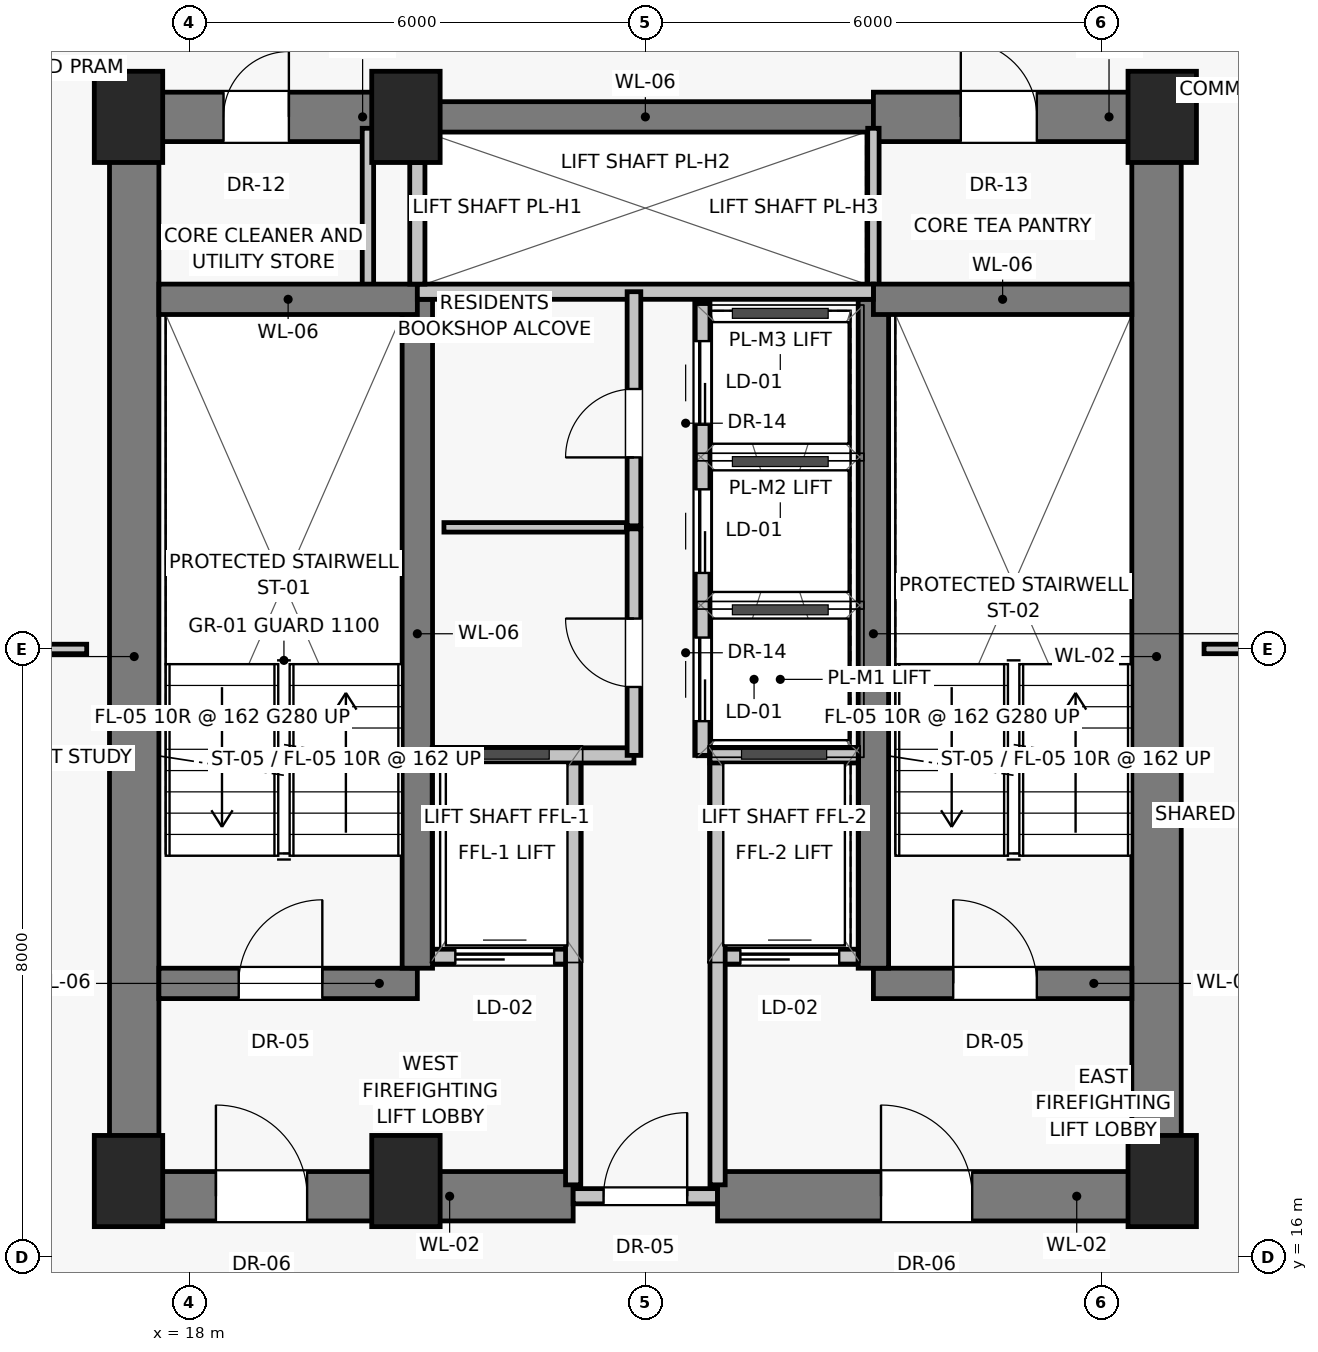
"""IFC4 building model, lengths in metres.
Left out: names, types, materials, properties, quantities, classifications, styles, units other than length and angle.
Written with IfcOpenShell. Run it as: python <this file> out.ifc"""

import sys

from ifc_helpers import new_model, si_unit, direction, frame, frame_2d, origin, origin_2d, place, context, subcontext, project, spatial, rectangle, extrude, source, transform, mapped, element, fill, save


model = new_model("IFC4")
c1 = context("Model", 3, precision=1e-05, world=origin(), true_north=direction((0.0, 1.0)))
c2 = subcontext(c1, "Body", "Model", "MODEL_VIEW")
j1 = project(units=[si_unit("LENGTHUNIT", "METRE"), si_unit("PLANEANGLEUNIT", "RADIAN")], contexts=[c1])
p1 = place(None, origin())
s1 = spatial("IfcSite", under=j1, at=p1, CompositionType="ELEMENT")
p2 = place(p1, origin())
s2 = spatial("IfcBuilding", under=s1, at=p2, CompositionType="ELEMENT")
p3 = place(p2, frame((0.0, 0.0, 145.75)))
s3 = spatial("IfcBuildingStorey", under=s2, at=p3, CompositionType="ELEMENT", Elevation=145.75)
for number, where, z_axis, x_axis in (
    (1, (17.2, 17.0, 0.0), (0.0, 0.0, 1.0), (1.0, 0.0, 0.0)),
    (2, (20.85, 17.0, 0.0), (0.0, 0.0, 1.0), (1.0, 0.0, 0.0)),
    (3, (30.8, 17.0, 0.0), (0.0, 0.0, 1.0), (1.0, 0.0, 0.0)),
    (4, (17.2, 31.0, 0.0), (0.0, 0.0, 1.0), (1.0, 0.0, 0.0)),
    (5, (20.85, 31.0, 0.0), (0.0, 0.0, 1.0), (1.0, 0.0, 0.0)),
    (6, (30.8, 31.0, 0.0), (0.0, 0.0, 1.0), (1.0, 0.0, 0.0)),
):
    element("IfcColumn", number, at=place(p3, frame(where, z_axis=z_axis, x_axis=x_axis)), inside=s3, PredefinedType="PILASTER", context=c2, shape_type="SweptSolid", body=[
        extrude(rectangle(XDim=0.9, YDim=1.2, at=origin_2d()), origin(), (0.0, 0.0, 1.0), 3.25),
    ])
for number, where, z_axis, x_axis in (
    (7, (17.275, 16.8, 0.0), (0.0, 0.0, 1.0), (0.0, 1.0, 0.0)),
    (8, (30.725, 16.8, 0.0), (0.0, 0.0, 1.0), (0.0, 1.0, 0.0)),
):
    element("IfcWall", number, at=place(p3, frame(where, z_axis=z_axis, x_axis=x_axis)), inside=s3, PredefinedType="SHEAR", context=c2, shape_type="SweptSolid", body=[
        extrude(rectangle(XDim=14.2, YDim=0.65, at=frame_2d((7.1, 0.0))), origin(), (0.0, 0.0, 1.0), 3.0),
    ])
p4 = place(p3, frame((17.2, 16.8, 0.0), z_axis=(0.0, 0.0, 1.0), x_axis=(1.0, 0.0, 0.0)))
e9 = element("IfcWall", 9, at=p4, inside=s3, PredefinedType="SHEAR", context=c2, shape_type="SweptSolid", body=[
    extrude(rectangle(XDim=5.85, YDim=0.65, at=frame_2d((2.925, 0.0))), origin(), (0.0, 0.0, 1.0), 3.0),
])
p5 = place(p4, frame((1.15, 0.0, 0.0)))
e10 = element("IfcOpeningElement", 10, at=p5, cuts=e9, PredefinedType="OPENING", context=c2, shape_type="SweptSolid", body=[
    extrude(rectangle(XDim=1.2, YDim=2.03, at=frame_2d((0.6, 1.015))), frame((0.0, 0.335, 0.0), z_axis=(0.0, -1.0, 0.0), x_axis=(1.0, 0.0, 0.0)), (0.0, 0.0, 1.0), 0.67),
])
p6 = place(p3, frame((23.05, 16.8, 0.0), z_axis=(0.0, 0.0, 1.0), x_axis=(1.0, 0.0, 0.0)))
e11 = element("IfcWall", 11, at=p6, inside=s3, PredefinedType="SOLIDWALL", context=c2, shape_type="SweptSolid", body=[
    extrude(rectangle(XDim=1.9, YDim=0.2, at=frame_2d((0.95, 0.0))), origin(), (0.0, 0.0, 1.0), 2.15),
])
p7 = place(p6, frame((0.4, 0.0, 0.0)))
e12 = element("IfcOpeningElement", 12, at=p7, cuts=e11, PredefinedType="OPENING", context=c2, shape_type="SweptSolid", body=[
    extrude(rectangle(XDim=1.1, YDim=2.03, at=frame_2d((0.55, 1.015))), frame((0.0, 0.11, 0.0), z_axis=(0.0, -1.0, 0.0), x_axis=(1.0, 0.0, 0.0)), (0.0, 0.0, 1.0), 0.22),
])
p8 = place(p3, frame((24.95, 16.8, 0.0), z_axis=(0.0, 0.0, 1.0), x_axis=(1.0, 0.0, 0.0)))
e13 = element("IfcWall", 13, at=p8, inside=s3, PredefinedType="SHEAR", context=c2, shape_type="SweptSolid", body=[
    extrude(rectangle(XDim=5.85, YDim=0.65, at=frame_2d((2.925, 0.0))), origin(), (0.0, 0.0, 1.0), 3.0),
])
p9 = place(p8, frame((2.15, 0.0, 0.0)))
e14 = element("IfcOpeningElement", 14, at=p9, cuts=e13, PredefinedType="OPENING", context=c2, shape_type="SweptSolid", body=[
    extrude(rectangle(XDim=1.2, YDim=2.03, at=frame_2d((0.6, 1.015))), frame((0.0, 0.335, 0.0), z_axis=(0.0, -1.0, 0.0), x_axis=(1.0, 0.0, 0.0)), (0.0, 0.0, 1.0), 0.67),
])
p10 = place(p3, frame((17.2, 31.0, 0.0), z_axis=(0.0, 0.0, 1.0), x_axis=(1.0, 0.0, 0.0)))
e15 = element("IfcWall", 15, at=p10, inside=s3, PredefinedType="SHEAR", context=c2, shape_type="SweptSolid", body=[
    extrude(rectangle(XDim=3.8, YDim=0.65, at=frame_2d((1.9, 0.0))), origin(), (0.0, 0.0, 1.0), 3.0),
])
p11 = place(p10, frame((1.25, 0.0, 0.0)))
e16 = element("IfcOpeningElement", 16, at=p11, cuts=e15, PredefinedType="OPENING", context=c2, shape_type="SweptSolid", body=[
    extrude(rectangle(XDim=0.86, YDim=2.01, at=frame_2d((0.43, 1.005))), frame((0.0, 0.335, 0.0), z_axis=(0.0, -1.0, 0.0), x_axis=(1.0, 0.0, 0.0)), (0.0, 0.0, 1.0), 0.67),
])
p12 = place(p3, frame((21.0, 31.0, 0.0), z_axis=(0.0, 0.0, 1.0), x_axis=(1.0, 0.0, 0.0)))
e17 = element("IfcWall", 17, at=p12, inside=s3, PredefinedType="SHEAR", context=c2, shape_type="SweptSolid", body=[
    extrude(rectangle(XDim=6.0, YDim=0.4, at=frame_2d((3.0, 0.0))), origin(), (0.0, 0.0, 1.0), 3.0),
])
p13 = place(p3, frame((27.0, 31.0, 0.0), z_axis=(0.0, 0.0, 1.0), x_axis=(1.0, 0.0, 0.0)))
e18 = element("IfcWall", 18, at=p13, inside=s3, PredefinedType="SHEAR", context=c2, shape_type="SweptSolid", body=[
    extrude(rectangle(XDim=3.8, YDim=0.65, at=frame_2d((1.9, 0.0))), origin(), (0.0, 0.0, 1.0), 3.0),
])
p14 = place(p13, frame((1.15, 0.0, 0.0)))
e19 = element("IfcOpeningElement", 19, at=p14, cuts=e18, PredefinedType="OPENING", context=c2, shape_type="SweptSolid", body=[
    extrude(rectangle(XDim=1.0, YDim=2.01, at=frame_2d((0.5, 1.005))), frame((0.0, 0.335, 0.0), z_axis=(0.0, -1.0, 0.0), x_axis=(1.0, 0.0, 0.0)), (0.0, 0.0, 1.0), 0.67),
])
for number, where, z_axis, x_axis in (
    (20, (20.35, 28.65, 0.0), (0.0, 0.0, 1.0), (0.0, 1.0, 0.0)),
    (21, (27.0, 28.65, 0.0), (0.0, 0.0, 1.0), (0.0, 1.0, 0.0)),
):
    element("IfcWall", number, at=place(p3, frame(where, z_axis=z_axis, x_axis=x_axis)), inside=s3, PredefinedType="PARTITIONING", context=c2, shape_type="SweptSolid", body=[
        extrude(rectangle(XDim=2.2, YDim=0.15, at=frame_2d((1.1, 0.0))), origin(), (0.0, 0.0, 1.0), 3.0),
    ])
p15 = place(p3, frame((17.6, 19.6, 0.0), z_axis=(0.0, 0.0, 1.0), x_axis=(1.0, 0.0, 0.0)))
e22 = element("IfcWall", 22, at=p15, inside=s3, PredefinedType="SHEAR", context=c2, shape_type="SweptSolid", body=[
    extrude(rectangle(XDim=3.4, YDim=0.4, at=frame_2d((1.7, 0.0))), origin(), (0.0, 0.0, 1.0), 3.0),
])
p16 = place(p15, frame((1.05, 0.0, 0.0)))
e23 = element("IfcOpeningElement", 23, at=p16, cuts=e22, PredefinedType="OPENING", context=c2, shape_type="SweptSolid", body=[
    extrude(rectangle(XDim=1.1, YDim=2.03, at=frame_2d((0.55, 1.015))), frame((0.0, 0.21, 0.0), z_axis=(0.0, -1.0, 0.0), x_axis=(1.0, 0.0, 0.0)), (0.0, 0.0, 1.0), 0.42),
])
p17 = place(p3, frame((21.2, 19.95, 0.0), z_axis=(0.0, 0.0, 1.0), x_axis=(1.0, 0.0, 0.0)))
e24 = element("IfcWall", 24, at=p17, inside=s3, PredefinedType="SOLIDWALL", context=c2, shape_type="SweptSolid", body=[
    extrude(rectangle(XDim=1.85, YDim=0.2, at=frame_2d((0.925, 0.0))), origin(), (0.0, 0.0, 1.0), 3.0),
])
p18 = place(p17, frame((0.3, 0.0, 0.0)))
e25 = element("IfcOpeningElement", 25, at=p18, cuts=e24, PredefinedType="OPENING", context=c2, shape_type="SweptSolid", body=[
    extrude(rectangle(XDim=1.3, YDim=2.25, at=frame_2d((0.65, 1.125))), frame((0.0, 0.11, 0.0), z_axis=(0.0, -1.0, 0.0), x_axis=(1.0, 0.0, 0.0)), (0.0, 0.0, 1.0), 0.22),
])
p19 = place(p3, frame((24.95, 19.95, 0.0), z_axis=(0.0, 0.0, 1.0), x_axis=(1.0, 0.0, 0.0)))
e26 = element("IfcWall", 26, at=p19, inside=s3, PredefinedType="SOLIDWALL", context=c2, shape_type="SweptSolid", body=[
    extrude(rectangle(XDim=1.85, YDim=0.2, at=frame_2d((0.925, 0.0))), origin(), (0.0, 0.0, 1.0), 3.0),
])
p20 = place(p19, frame((0.3, 0.0, 0.0)))
e27 = element("IfcOpeningElement", 27, at=p20, cuts=e26, PredefinedType="OPENING", context=c2, shape_type="SweptSolid", body=[
    extrude(rectangle(XDim=1.3, YDim=2.25, at=frame_2d((0.65, 1.125))), frame((0.0, 0.11, 0.0), z_axis=(0.0, -1.0, 0.0), x_axis=(1.0, 0.0, 0.0)), (0.0, 0.0, 1.0), 0.22),
])
p21 = place(p3, frame((27.0, 19.6, 0.0), z_axis=(0.0, 0.0, 1.0), x_axis=(1.0, 0.0, 0.0)))
e28 = element("IfcWall", 28, at=p21, inside=s3, PredefinedType="SHEAR", context=c2, shape_type="SweptSolid", body=[
    extrude(rectangle(XDim=3.4, YDim=0.4, at=frame_2d((1.7, 0.0))), origin(), (0.0, 0.0, 1.0), 3.0),
])
p22 = place(p21, frame((1.05, 0.0, 0.0)))
e29 = element("IfcOpeningElement", 29, at=p22, cuts=e28, PredefinedType="OPENING", context=c2, shape_type="SweptSolid", body=[
    extrude(rectangle(XDim=1.1, YDim=2.03, at=frame_2d((0.55, 1.015))), frame((0.0, 0.21, 0.0), z_axis=(0.0, -1.0, 0.0), x_axis=(1.0, 0.0, 0.0)), (0.0, 0.0, 1.0), 0.42),
])
for number, where, z_axis, x_axis in (
    (30, (21.0, 19.8, 0.0), (0.0, 0.0, 1.0), (0.0, 1.0, 0.0)),
    (31, (27.0, 19.8, 0.0), (0.0, 0.0, 1.0), (0.0, 1.0, 0.0)),
):
    element("IfcWall", number, at=place(p3, frame(where, z_axis=z_axis, x_axis=x_axis)), inside=s3, PredefinedType="SHEAR", context=c2, shape_type="SweptSolid", body=[
        extrude(rectangle(XDim=8.8, YDim=0.4, at=frame_2d((4.4, 0.0))), origin(), (0.0, 0.0, 1.0), 3.0),
    ])
for number, where, z_axis, x_axis in (
    (32, (17.6, 28.6, 0.0), (0.0, 0.0, 1.0), (1.0, 0.0, 0.0)),
    (33, (27.0, 28.6, 0.0), (0.0, 0.0, 1.0), (1.0, 0.0, 0.0)),
):
    element("IfcWall", number, at=place(p3, frame(where, z_axis=z_axis, x_axis=x_axis)), inside=s3, PredefinedType="SHEAR", context=c2, shape_type="SweptSolid", body=[
        extrude(rectangle(XDim=3.4, YDim=0.4, at=frame_2d((1.7, 0.0))), origin(), (0.0, 0.0, 1.0), 3.0),
    ])
for number, where, z_axis, x_axis in (
    (34, (23.05, 16.95, 0.0), (0.0, 0.0, 1.0), (0.0, 1.0, 0.0)),
    (35, (24.95, 16.95, 0.0), (0.0, 0.0, 1.0), (0.0, 1.0, 0.0)),
):
    element("IfcWall", number, at=place(p3, frame(where, z_axis=z_axis, x_axis=x_axis)), inside=s3, PredefinedType="SOLIDWALL", context=c2, shape_type="SweptSolid", body=[
        extrude(rectangle(XDim=5.6, YDim=0.2, at=frame_2d((2.8, 0.0))), origin(), (0.0, 0.0, 1.0), 3.0),
    ])
p23 = place(p3, frame((21.2, 22.6, 0.0), z_axis=(0.0, 0.0, 1.0), x_axis=(1.0, 0.0, 0.0)))
e36 = element("IfcWall", 36, at=p23, inside=s3, PredefinedType="SOLIDWALL", context=c2, shape_type="SweptSolid", body=[
    extrude(rectangle(XDim=2.65, YDim=0.2, at=frame_2d((1.325, 0.0))), origin(), (0.0, 0.0, 1.0), 3.0),
])
p24 = place(p3, frame((24.85, 22.6, 0.0), z_axis=(0.0, 0.0, 1.0), x_axis=(1.0, 0.0, 0.0)))
e37 = element("IfcWall", 37, at=p24, inside=s3, PredefinedType="SOLIDWALL", context=c2, shape_type="SweptSolid", body=[
    extrude(rectangle(XDim=1.95, YDim=0.2, at=frame_2d((0.975, 0.0))), origin(), (0.0, 0.0, 1.0), 3.0),
])
p25 = place(p3, frame((21.0, 28.7, 0.0), z_axis=(0.0, 0.0, 1.0), x_axis=(1.0, 0.0, 0.0)))
e38 = element("IfcWall", 38, at=p25, inside=s3, PredefinedType="SOLIDWALL", context=c2, shape_type="SweptSolid", body=[
    extrude(rectangle(XDim=6.0, YDim=0.2, at=frame_2d((3.0, 0.0))), origin(), (0.0, 0.0, 1.0), 3.0),
])
p26 = place(p3, frame((21.0, 28.8, 0.0), z_axis=(0.0, 0.0, 1.0), x_axis=(0.0, 1.0, 0.0)))
e39 = element("IfcWall", 39, at=p26, inside=s3, PredefinedType="SOLIDWALL", context=c2, shape_type="SweptSolid", body=[
    extrude(rectangle(XDim=1.6, YDim=0.2, at=frame_2d((0.8, 0.0))), origin(), (0.0, 0.0, 1.0), 3.0),
])
p27 = place(p3, frame((23.85, 22.6, 0.0), z_axis=(0.0, 0.0, 1.0), x_axis=(0.0, 1.0, 0.0)))
e40 = element("IfcWall", 40, at=p27, inside=s3, PredefinedType="PARTITIONING", context=c2, shape_type="SweptSolid", body=[
    extrude(rectangle(XDim=2.98, YDim=0.18, at=frame_2d((1.49, 0.0))), origin(), (0.0, 0.0, 1.0), 3.0),
])
p28 = place(p27, frame((0.9, 0.0, 0.0)))
e41 = element("IfcOpeningElement", 41, at=p28, cuts=e40, PredefinedType="OPENING", context=c2, shape_type="SweptSolid", body=[
    extrude(rectangle(XDim=0.9, YDim=2.01, at=frame_2d((0.45, 1.005))), frame((0.0, 0.1, 0.0), z_axis=(0.0, -1.0, 0.0), x_axis=(1.0, 0.0, 0.0)), (0.0, 0.0, 1.0), 0.2),
])
p29 = place(p3, frame((23.85, 25.62, 0.0), z_axis=(0.0, 0.0, 1.0), x_axis=(0.0, 1.0, 0.0)))
e42 = element("IfcWall", 42, at=p29, inside=s3, PredefinedType="PARTITIONING", context=c2, shape_type="SweptSolid", body=[
    extrude(rectangle(XDim=3.08, YDim=0.18, at=frame_2d((1.54, 0.0))), origin(), (0.0, 0.0, 1.0), 3.0),
])
p30 = place(p29, frame((0.9, 0.0, 0.0)))
e43 = element("IfcOpeningElement", 43, at=p30, cuts=e42, PredefinedType="OPENING", context=c2, shape_type="SweptSolid", body=[
    extrude(rectangle(XDim=0.9, YDim=2.01, at=frame_2d((0.45, 1.005))), frame((0.0, 0.1, 0.0), z_axis=(0.0, -1.0, 0.0), x_axis=(1.0, 0.0, 0.0)), (0.0, 0.0, 1.0), 0.2),
])
p31 = place(p3, frame((24.75, 22.6, 0.0), z_axis=(0.0, 0.0, 1.0), x_axis=(0.0, 1.0, 0.0)))
e44 = element("IfcWall", 44, at=p31, inside=s3, PredefinedType="SOLIDWALL", context=c2, shape_type="SweptSolid", body=[
    extrude(rectangle(XDim=5.95, YDim=0.2, at=frame_2d((2.975, 0.0))), origin(), (0.0, 0.0, 1.0), 3.0),
])
p32 = place(p31, frame((0.45, 0.0, 0.0)))
e45 = element("IfcOpeningElement", 45, at=p32, cuts=e44, PredefinedType="OPENING", context=c2, shape_type="SweptSolid", body=[
    extrude(rectangle(XDim=1.1, YDim=2.08, at=frame_2d((0.55, 1.04))), frame((0.0, 0.11, 0.0), z_axis=(0.0, -1.0, 0.0), x_axis=(1.0, 0.0, 0.0)), (0.0, 0.0, 1.0), 0.22),
])
p33 = place(p31, frame((2.4, 0.0, 0.0)))
e46 = element("IfcOpeningElement", 46, at=p33, cuts=e44, PredefinedType="OPENING", context=c2, shape_type="SweptSolid", body=[
    extrude(rectangle(XDim=1.1, YDim=2.08, at=frame_2d((0.55, 1.04))), frame((0.0, 0.11, 0.0), z_axis=(0.0, -1.0, 0.0), x_axis=(1.0, 0.0, 0.0)), (0.0, 0.0, 1.0), 0.22),
])
p34 = place(p31, frame((4.35, 0.0, 0.0)))
e47 = element("IfcOpeningElement", 47, at=p34, cuts=e44, PredefinedType="OPENING", context=c2, shape_type="SweptSolid", body=[
    extrude(rectangle(XDim=1.1, YDim=2.08, at=frame_2d((0.55, 1.04))), frame((0.0, 0.11, 0.0), z_axis=(0.0, -1.0, 0.0), x_axis=(1.0, 0.0, 0.0)), (0.0, 0.0, 1.0), 0.22),
])
p35 = place(p3, frame((21.35, 25.6, 0.0), z_axis=(0.0, 0.0, 1.0), x_axis=(1.0, 0.0, 0.0)))
e48 = element("IfcWall", 48, at=p35, inside=s3, PredefinedType="PARTITIONING", context=c2, shape_type="SweptSolid", body=[
    extrude(rectangle(XDim=2.4, YDim=0.125, at=frame_2d((1.2, 0.0))), origin(), (0.0, 0.0, 1.0), 3.0),
])
for number, where, z_axis, x_axis in (
    (49, (14.55, 24.0, 0.0), (0.0, 0.0, 1.0), (1.0, 0.0, 0.0)),
    (50, (31.35, 24.0, 0.0), (0.0, 0.0, 1.0), (1.0, 0.0, 0.0)),
):
    element("IfcWall", number, at=place(p3, frame(where, z_axis=z_axis, x_axis=x_axis)), inside=s3, PredefinedType="PARTITIONING", context=c2, shape_type="SweptSolid", body=[
        extrude(rectangle(XDim=2.1, YDim=0.125, at=frame_2d((1.05, 0.0))), origin(), (0.0, 0.0, 1.0), 3.0),
    ])
m1 = source(origin(), c2, "Body", "SweptSolid", [
    extrude(rectangle(XDim=1.2, YDim=2.03, at=frame_2d((0.6, 1.015))), frame((0.0, 0.025, 0.0), z_axis=(0.0, -1.0, 0.0), x_axis=(1.0, 0.0, 0.0)), (0.0, 0.0, 1.0), 0.05),
])
p36 = place(p5, origin())
e51 = element("IfcDoor", 51, at=p36, inside=s3, OperationType="SINGLE_SWING_LEFT", PredefinedType="DOOR", context=c2, shape_type="MappedRepresentation", body=[
    mapped(m1, transform((0.0, 0.0, 0.0), scale=1.0)),
])
fill(e10, e51)
m2 = source(origin(), c2, "Body", "SweptSolid", [
    extrude(rectangle(XDim=1.1, YDim=2.03, at=frame_2d((0.55, 1.015))), frame((0.0, 0.025, 0.0), z_axis=(0.0, -1.0, 0.0), x_axis=(1.0, 0.0, 0.0)), (0.0, 0.0, 1.0), 0.05),
])
p37 = place(p7, origin())
e52 = element("IfcDoor", 52, at=p37, inside=s3, OperationType="SINGLE_SWING_RIGHT", PredefinedType="DOOR", context=c2, shape_type="MappedRepresentation", body=[
    mapped(m2, transform((0.0, 0.0, 0.0), scale=1.0)),
])
fill(e12, e52)
p38 = place(p9, origin())
e53 = element("IfcDoor", 53, at=p38, inside=s3, OperationType="SINGLE_SWING_LEFT", PredefinedType="DOOR", context=c2, shape_type="MappedRepresentation", body=[
    mapped(m1, transform((0.0, 0.0, 0.0), scale=1.0)),
])
fill(e14, e53)
m3 = source(origin(), c2, "Body", "SweptSolid", [
    extrude(rectangle(XDim=0.86, YDim=2.01, at=frame_2d((0.43, 1.005))), frame((0.0, 0.025, 0.0), z_axis=(0.0, -1.0, 0.0), x_axis=(1.0, 0.0, 0.0)), (0.0, 0.0, 1.0), 0.05),
])
p39 = place(p11, origin())
e54 = element("IfcDoor", 54, at=p39, inside=s3, OperationType="SINGLE_SWING_RIGHT", PredefinedType="DOOR", context=c2, shape_type="MappedRepresentation", body=[
    mapped(m3, transform((0.0, 0.0, 0.0), scale=1.0)),
])
fill(e16, e54)
m4 = source(origin(), c2, "Body", "SweptSolid", [
    extrude(rectangle(XDim=1.0, YDim=2.01, at=frame_2d((0.5, 1.005))), frame((0.0, 0.025, 0.0), z_axis=(0.0, -1.0, 0.0), x_axis=(1.0, 0.0, 0.0)), (0.0, 0.0, 1.0), 0.05),
])
p40 = place(p14, origin())
e55 = element("IfcDoor", 55, at=p40, inside=s3, OperationType="SINGLE_SWING_LEFT", PredefinedType="DOOR", context=c2, shape_type="MappedRepresentation", body=[
    mapped(m4, transform((0.0, 0.0, 0.0), scale=1.0)),
])
fill(e19, e55)
p41 = place(p16, origin())
e56 = element("IfcDoor", 56, at=p41, inside=s3, OperationType="SINGLE_SWING_RIGHT", PredefinedType="DOOR", context=c2, shape_type="MappedRepresentation", body=[
    mapped(m2, transform((0.0, 0.0, 0.0), scale=1.0)),
])
fill(e23, e56)
m5 = source(origin(), c2, "Body", "SweptSolid", [
    extrude(rectangle(XDim=1.3, YDim=2.25, at=frame_2d((0.65, 1.125))), frame((0.0, 0.025, 0.0), z_axis=(0.0, -1.0, 0.0), x_axis=(1.0, 0.0, 0.0)), (0.0, 0.0, 1.0), 0.05),
])
p42 = place(p18, origin())
e57 = element("IfcDoor", 57, at=p42, inside=s3, OperationType="SLIDING_TO_LEFT", PredefinedType="DOOR", context=c2, shape_type="MappedRepresentation", body=[
    mapped(m5, transform((0.0, 0.0, 0.0), scale=1.0)),
])
fill(e25, e57)
p43 = place(p20, origin())
e58 = element("IfcDoor", 58, at=p43, inside=s3, OperationType="SLIDING_TO_LEFT", PredefinedType="DOOR", context=c2, shape_type="MappedRepresentation", body=[
    mapped(m5, transform((0.0, 0.0, 0.0), scale=1.0)),
])
fill(e27, e58)
p44 = place(p22, origin())
e59 = element("IfcDoor", 59, at=p44, inside=s3, OperationType="SINGLE_SWING_LEFT", PredefinedType="DOOR", context=c2, shape_type="MappedRepresentation", body=[
    mapped(m2, transform((0.0, 0.0, 0.0), scale=1.0)),
])
fill(e29, e59)
m6 = source(origin(), c2, "Body", "SweptSolid", [
    extrude(rectangle(XDim=0.9, YDim=2.01, at=frame_2d((0.45, 1.005))), frame((0.0, 0.025, 0.0), z_axis=(0.0, -1.0, 0.0), x_axis=(1.0, 0.0, 0.0)), (0.0, 0.0, 1.0), 0.05),
])
p45 = place(p28, origin())
e60 = element("IfcDoor", 60, at=p45, inside=s3, OperationType="SINGLE_SWING_RIGHT", PredefinedType="DOOR", context=c2, shape_type="MappedRepresentation", body=[
    mapped(m6, transform((0.0, 0.0, 0.0), scale=1.0)),
])
fill(e41, e60)
p46 = place(p30, origin())
e61 = element("IfcDoor", 61, at=p46, inside=s3, OperationType="SINGLE_SWING_LEFT", PredefinedType="DOOR", context=c2, shape_type="MappedRepresentation", body=[
    mapped(m6, transform((0.0, 0.0, 0.0), scale=1.0)),
])
fill(e43, e61)
m7 = source(origin(), c2, "Body", "SweptSolid", [
    extrude(rectangle(XDim=1.1, YDim=2.08, at=frame_2d((0.55, 1.04))), frame((0.0, 0.025, 0.0), z_axis=(0.0, -1.0, 0.0), x_axis=(1.0, 0.0, 0.0)), (0.0, 0.0, 1.0), 0.05),
])
p47 = place(p32, origin())
e62 = element("IfcDoor", 62, at=p47, inside=s3, OperationType="SLIDING_TO_LEFT", PredefinedType="DOOR", context=c2, shape_type="MappedRepresentation", body=[
    mapped(m7, transform((0.0, 0.0, 0.0), scale=1.0)),
])
fill(e45, e62)
p48 = place(p33, origin())
e63 = element("IfcDoor", 63, at=p48, inside=s3, OperationType="SLIDING_TO_LEFT", PredefinedType="DOOR", context=c2, shape_type="MappedRepresentation", body=[
    mapped(m7, transform((0.0, 0.0, 0.0), scale=1.0)),
])
fill(e46, e63)
p49 = place(p34, origin())
e64 = element("IfcDoor", 64, at=p49, inside=s3, OperationType="SLIDING_TO_LEFT", PredefinedType="DOOR", context=c2, shape_type="MappedRepresentation", body=[
    mapped(m7, transform((0.0, 0.0, 0.0), scale=1.0)),
])
fill(e47, e64)
save(model, sys.argv[1])
